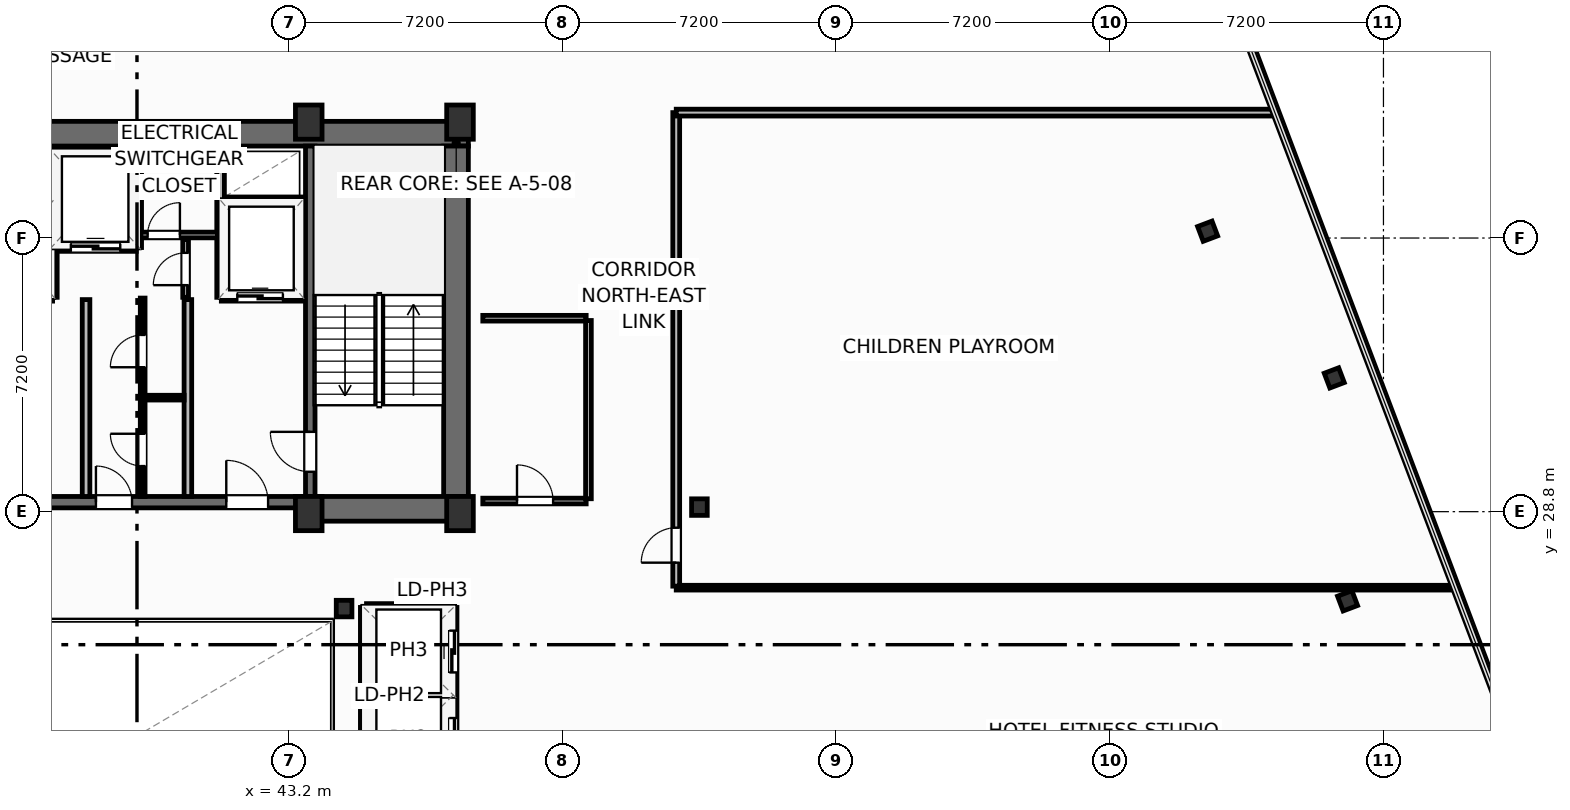
"""IFC4 building model, lengths in metres.
Left out: names, types, materials, properties, quantities, classifications, styles, units other than length and angle.
Written with IfcOpenShell. Run it as: python <this file> out.ifc"""

import sys

from ifc_helpers import new_model, si_unit, direction, frame, frame_2d, origin, origin_2d, place, context, subcontext, project, spatial, rectangle, i_section, extrude, element, fill, save


model = new_model("IFC4")
c1 = context("Model", 3, precision=1e-05, world=origin(), true_north=direction((0.0, 1.0)))
c2 = subcontext(c1, "Body", "Model", "MODEL_VIEW")
j1 = project(units=[si_unit("LENGTHUNIT", "METRE"), si_unit("PLANEANGLEUNIT", "RADIAN")], contexts=[c1])
p1 = place(None, origin())
s1 = spatial("IfcSite", under=j1, at=p1, CompositionType="ELEMENT")
p2 = place(p1, origin())
s2 = spatial("IfcBuilding", under=s1, at=p2, CompositionType="ELEMENT")
p3 = place(p2, frame((0.0, 0.0, 242.3)))
s3 = spatial("IfcBuildingStorey", under=s2, at=p3, CompositionType="ELEMENT", Elevation=242.3)
for number, where, z_axis, x_axis in (
    (1, (43.72, 28.75, 0.0), (0.0, 0.0, 1.0), (1.0, 0.0, 0.0)),
    (2, (47.7, 28.75, 0.0), (0.0, 0.0, 1.0), (1.0, 0.0, 0.0)),
    (3, (43.72, 39.05, 0.0), (0.0, 0.0, 1.0), (1.0, 0.0, 0.0)),
    (4, (47.7, 39.05, 0.0), (0.0, 0.0, 1.0), (1.0, 0.0, 0.0)),
):
    element("IfcColumn", number, at=place(p3, frame(where, z_axis=z_axis, x_axis=x_axis)), inside=s3, PredefinedType="COLUMN", context=c2, shape_type="SweptSolid", body=[
        extrude(rectangle(XDim=0.7, YDim=0.9, at=origin_2d()), origin(), (0.0, 0.0, 1.0), 3.7),
    ])
for number, where, z_axis, x_axis in (
    (5, (44.65, 26.25, 0.0), (0.0, 0.0, 1.0), (1.0, 0.0, 0.0)),
    (6, (54.0, 28.92, 0.0), (0.0, 0.0, 1.0), (1.0, 0.0, 0.0)),
):
    element("IfcColumn", number, at=place(p3, frame(where, z_axis=z_axis, x_axis=x_axis)), inside=s3, PredefinedType="COLUMN", context=c2, shape_type="SweptSolid", body=[
        extrude(i_section(OverallWidth=0.412, OverallDepth=0.435, WebThickness=0.036, FlangeThickness=0.057, FilletRadius=0.025, at=origin_2d()), origin(), (0.0, 0.0, 1.0), 3.7),
    ])
p4 = place(p3, frame((30.48, 38.745, 0.0), z_axis=(0.0, 0.0, 1.0), x_axis=(1.0, 0.0, 0.0)))
e7 = element("IfcWall", 7, at=p4, inside=s3, PredefinedType="SHEAR", context=c2, shape_type="SweptSolid", body=[
    extrude(rectangle(XDim=17.44, YDim=0.65, at=frame_2d((8.72, 0.0))), origin(), (0.0, 0.0, 1.0), 3.45),
])
p5 = place(p3, frame((47.595, 29.2, 0.0), z_axis=(0.0, 0.0, 1.0), x_axis=(0.0, 1.0, 0.0)))
e8 = element("IfcWall", 8, at=p5, inside=s3, PredefinedType="SHEAR", context=c2, shape_type="SweptSolid", body=[
    extrude(rectangle(XDim=9.22, YDim=0.65, at=frame_2d((4.61, 0.0))), origin(), (0.0, 0.0, 1.0), 3.45),
])
p6 = place(p3, frame((43.6, 28.875, 0.0), z_axis=(0.0, 0.0, 1.0), x_axis=(1.0, 0.0, 0.0)))
e9 = element("IfcWall", 9, at=p6, inside=s3, PredefinedType="SHEAR", context=c2, shape_type="SweptSolid", body=[
    extrude(rectangle(XDim=4.32, YDim=0.65, at=frame_2d((2.16, 0.0))), origin(), (0.0, 0.0, 1.0), 3.45),
])
p7 = place(p3, frame((34.8, 29.05, 0.0), z_axis=(0.0, 0.0, 1.0), x_axis=(1.0, 0.0, 0.0)))
e10 = element("IfcWall", 10, at=p7, inside=s3, PredefinedType="SHEAR", context=c2, shape_type="SweptSolid", body=[
    extrude(rectangle(XDim=8.8, YDim=0.3, at=frame_2d((4.4, 0.0))), origin(), (0.0, 0.0, 1.0), 3.45),
])
p8 = place(p7, frame((0.95, 0.0, 0.0)))
e11 = element("IfcOpeningElement", 11, at=p8, cuts=e10, PredefinedType="OPENING", context=c2, shape_type="SweptSolid", body=[
    extrude(rectangle(XDim=1.1, YDim=2.15, at=frame_2d((0.55, 1.075))), frame((0.0, 0.16, 0.0), z_axis=(0.0, -1.0, 0.0), x_axis=(1.0, 0.0, 0.0)), (0.0, 0.0, 1.0), 0.32),
])
p9 = place(p7, frame((6.75, 0.0, 0.0)))
e12 = element("IfcOpeningElement", 12, at=p9, cuts=e10, PredefinedType="OPENING", context=c2, shape_type="SweptSolid", body=[
    extrude(rectangle(XDim=1.1, YDim=2.15, at=frame_2d((0.55, 1.075))), frame((0.0, 0.16, 0.0), z_axis=(0.0, -1.0, 0.0), x_axis=(1.0, 0.0, 0.0)), (0.0, 0.0, 1.0), 0.32),
])
p10 = place(p7, frame((3.32, 0.0, 0.0)))
e13 = element("IfcOpeningElement", 13, at=p10, cuts=e10, PredefinedType="OPENING", context=c2, shape_type="SweptSolid", body=[
    extrude(rectangle(XDim=0.95, YDim=2.15, at=frame_2d((0.475, 1.075))), frame((0.0, 0.16, 0.0), z_axis=(0.0, -1.0, 0.0), x_axis=(1.0, 0.0, 0.0)), (0.0, 0.0, 1.0), 0.32),
])
p11 = place(p3, frame((43.76, 29.2, 0.0), z_axis=(0.0, 0.0, 1.0), x_axis=(0.0, 1.0, 0.0)))
e14 = element("IfcWall", 14, at=p11, inside=s3, PredefinedType="SHEAR", context=c2, shape_type="SweptSolid", body=[
    extrude(rectangle(XDim=9.22, YDim=0.25, at=frame_2d((4.61, 0.0))), origin(), (0.0, 0.0, 1.0), 3.45),
])
p12 = place(p11, frame((0.65, 0.0, 0.0)))
e15 = element("IfcOpeningElement", 15, at=p12, cuts=e14, PredefinedType="OPENING", context=c2, shape_type="SweptSolid", body=[
    extrude(rectangle(XDim=1.05, YDim=2.15, at=frame_2d((0.525, 1.075))), frame((0.0, 0.135, 0.0), z_axis=(0.0, -1.0, 0.0), x_axis=(1.0, 0.0, 0.0)), (0.0, 0.0, 1.0), 0.27),
])
for number, where, z_axis, x_axis in (
    (16, (71.055, 26.453, 0.0), (0.0, 0.0, 1.0), (0.935, 0.354, 0.0)),
    (17, (70.706, 32.32, 0.0), (0.0, 0.0, 1.0), (0.935, 0.354, 0.0)),
    (18, (67.373, 36.18, 0.0), (0.0, 0.0, 1.0), (0.935, 0.354, 0.0)),
):
    element("IfcColumn", number, at=place(p3, frame(where, z_axis=z_axis, x_axis=x_axis)), inside=s3, PredefinedType="COLUMN", context=c2, shape_type="SweptSolid", body=[
        extrude(i_section(OverallWidth=0.406, OverallDepth=0.416, WebThickness=0.03, FlangeThickness=0.048, FilletRadius=0.025, at=origin_2d()), origin(), (0.0, 0.0, 1.0), 3.7),
    ])
p13 = place(p3, frame((53.39, 26.8, 0.0), z_axis=(0.0, 0.0, 1.0), x_axis=(1.0, 0.0, 0.0)))
e19 = element("IfcWall", 19, at=p13, inside=s3, PredefinedType="PARTITIONING", context=c2, shape_type="SweptSolid", body=[
    extrude(rectangle(XDim=20.445, YDim=0.125, at=frame_2d((10.223, 0.0))), origin(), (0.0, 0.0, 1.0), 2.739),
])
p14 = place(p3, frame((53.39, 26.84, 0.0), z_axis=(0.0, 0.0, 1.0), x_axis=(0.0, 1.0, 0.0)))
e20 = element("IfcWall", 20, at=p14, inside=s3, PredefinedType="PARTITIONING", context=c2, shape_type="SweptSolid", body=[
    extrude(rectangle(XDim=12.46, YDim=0.18, at=frame_2d((6.23, 0.0))), origin(), (0.0, 0.0, 1.0), 3.45),
])
p15 = place(p14, frame((0.618, 0.0, 0.0)))
e21 = element("IfcOpeningElement", 21, at=p15, cuts=e20, PredefinedType="OPENING", context=c2, shape_type="SweptSolid", body=[
    extrude(rectangle(XDim=0.92, YDim=2.05, at=frame_2d((0.46, 1.025))), frame((0.0, 0.1, 0.0), z_axis=(0.0, -1.0, 0.0), x_axis=(1.0, 0.0, 0.0)), (0.0, 0.0, 1.0), 0.2),
])
p16 = place(p3, frame((53.39, 39.3, 0.0), z_axis=(0.0, 0.0, 1.0), x_axis=(1.0, 0.0, 0.0)))
e22 = element("IfcWall", 22, at=p16, inside=s3, PredefinedType="PARTITIONING", context=c2, shape_type="SweptSolid", body=[
    extrude(rectangle(XDim=15.713, YDim=0.18, at=frame_2d((7.856, 0.0))), origin(), (0.0, 0.0, 1.0), 3.45),
])
for number, where, z_axis, x_axis in (
    (23, (37.86, 29.2, 0.0), (0.0, 0.0, 1.0), (0.0, 1.0, 0.0)),
    (24, (40.54, 29.2, 0.0), (0.0, 0.0, 1.0), (0.0, 1.0, 0.0)),
):
    element("IfcWall", number, at=place(p3, frame(where, z_axis=z_axis, x_axis=x_axis)), inside=s3, PredefinedType="PARTITIONING", context=c2, shape_type="SweptSolid", body=[
        extrude(rectangle(XDim=5.18, YDim=0.2, at=frame_2d((2.59, 0.0))), origin(), (0.0, 0.0, 1.0), 3.45),
    ])
p17 = place(p3, frame((37.0, 34.44, 0.0), z_axis=(0.0, 0.0, 1.0), x_axis=(0.0, 1.0, 0.0)))
e25 = element("IfcWall", 25, at=p17, inside=s3, PredefinedType="PARTITIONING", context=c2, shape_type="SweptSolid", body=[
    extrude(rectangle(XDim=3.9, YDim=0.2, at=frame_2d((1.95, 0.0))), origin(), (0.0, 0.0, 1.0), 3.45),
])
p18 = place(p3, frame((41.42, 34.44, 0.0), z_axis=(0.0, 0.0, 1.0), x_axis=(1.0, 0.0, 0.0)))
e26 = element("IfcWall", 26, at=p18, inside=s3, PredefinedType="PARTITIONING", context=c2, shape_type="SweptSolid", body=[
    extrude(rectangle(XDim=2.18, YDim=0.2, at=frame_2d((1.09, 0.0))), origin(), (0.0, 0.0, 1.0), 3.45),
])
p19 = place(p18, frame((0.42, 0.0, 0.0)))
e27 = element("IfcOpeningElement", 27, at=p19, cuts=e26, PredefinedType="OPENING", context=c2, shape_type="SweptSolid", body=[
    extrude(rectangle(XDim=1.2, YDim=2.2, at=frame_2d((0.6, 1.1))), frame((0.0, 0.11, 0.0), z_axis=(0.0, -1.0, 0.0), x_axis=(1.0, 0.0, 0.0)), (0.0, 0.0, 1.0), 0.22),
])
p20 = place(p3, frame((41.42, 36.98, 0.0), z_axis=(0.0, 0.0, 1.0), x_axis=(1.0, 0.0, 0.0)))
e28 = element("IfcWall", 28, at=p20, inside=s3, PredefinedType="PARTITIONING", context=c2, shape_type="SweptSolid", body=[
    extrude(rectangle(XDim=2.18, YDim=0.2, at=frame_2d((1.09, 0.0))), origin(), (0.0, 0.0, 1.0), 3.45),
])
p21 = place(p3, frame((41.4, 34.44, 0.0), z_axis=(0.0, 0.0, 1.0), x_axis=(0.0, 1.0, 0.0)))
e29 = element("IfcWall", 29, at=p21, inside=s3, PredefinedType="PARTITIONING", context=c2, shape_type="SweptSolid", body=[
    extrude(rectangle(XDim=3.9, YDim=0.2, at=frame_2d((1.95, 0.0))), origin(), (0.0, 0.0, 1.0), 3.45),
])
p22 = place(p3, frame((37.06, 35.75, 0.0), z_axis=(0.0, 0.0, 1.0), x_axis=(1.0, 0.0, 0.0)))
e30 = element("IfcWall", 30, at=p22, inside=s3, PredefinedType="PARTITIONING", context=c2, shape_type="SweptSolid", body=[
    extrude(rectangle(XDim=2.12, YDim=0.2, at=frame_2d((1.06, 0.0))), origin(), (0.0, 0.0, 1.0), 3.45),
])
p23 = place(p22, frame((0.4, 0.0, 0.0)))
e31 = element("IfcOpeningElement", 31, at=p23, cuts=e30, PredefinedType="OPENING", context=c2, shape_type="SweptSolid", body=[
    extrude(rectangle(XDim=1.3, YDim=2.2, at=frame_2d((0.65, 1.1))), frame((0.0, 0.11, 0.0), z_axis=(0.0, -1.0, 0.0), x_axis=(1.0, 0.0, 0.0)), (0.0, 0.0, 1.0), 0.22),
])
p24 = place(p3, frame((39.22, 35.75, 0.0), z_axis=(0.0, 0.0, 1.0), x_axis=(0.0, 1.0, 0.0)))
e32 = element("IfcWall", 32, at=p24, inside=s3, PredefinedType="PARTITIONING", context=c2, shape_type="SweptSolid", body=[
    extrude(rectangle(XDim=2.59, YDim=0.2, at=frame_2d((1.295, 0.0))), origin(), (0.0, 0.0, 1.0), 3.45),
])
p25 = place(p3, frame((39.3, 36.08, 0.0), z_axis=(0.0, 0.0, 1.0), x_axis=(1.0, 0.0, 0.0)))
e33 = element("IfcWall", 33, at=p25, inside=s3, PredefinedType="PARTITIONING", context=c2, shape_type="SweptSolid", body=[
    extrude(rectangle(XDim=2.02, YDim=0.15, at=frame_2d((1.01, 0.0))), origin(), (0.0, 0.0, 1.0), 3.45),
])
p26 = place(p25, frame((0.18, 0.0, 0.0)))
e34 = element("IfcOpeningElement", 34, at=p26, cuts=e33, PredefinedType="OPENING", context=c2, shape_type="SweptSolid", body=[
    extrude(rectangle(XDim=0.85, YDim=2.05, at=frame_2d((0.425, 1.025))), frame((0.0, 0.085, 0.0), z_axis=(0.0, -1.0, 0.0), x_axis=(1.0, 0.0, 0.0)), (0.0, 0.0, 1.0), 0.17),
])
p27 = place(p3, frame((40.48, 34.44, 0.0), z_axis=(0.0, 0.0, 1.0), x_axis=(0.0, 1.0, 0.0)))
e35 = element("IfcWall", 35, at=p27, inside=s3, PredefinedType="PARTITIONING", context=c2, shape_type="SweptSolid", body=[
    extrude(rectangle(XDim=1.52, YDim=0.15, at=frame_2d((0.76, 0.0))), origin(), (0.0, 0.0, 1.0), 3.45),
])
p28 = place(p27, frame((0.32, 0.0, 0.0)))
e36 = element("IfcOpeningElement", 36, at=p28, cuts=e35, PredefinedType="OPENING", context=c2, shape_type="SweptSolid", body=[
    extrude(rectangle(XDim=0.85, YDim=2.05, at=frame_2d((0.425, 1.025))), frame((0.0, 0.085, 0.0), z_axis=(0.0, -1.0, 0.0), x_axis=(1.0, 0.0, 0.0)), (0.0, 0.0, 1.0), 0.17),
])
p29 = place(p3, frame((39.35, 31.8, 0.0), z_axis=(0.0, 0.0, 1.0), x_axis=(1.0, 0.0, 0.0)))
e37 = element("IfcWall", 37, at=p29, inside=s3, PredefinedType="PARTITIONING", context=c2, shape_type="SweptSolid", body=[
    extrude(rectangle(XDim=1.09, YDim=0.125, at=frame_2d((0.545, 0.0))), origin(), (0.0, 0.0, 1.0), 3.45),
])
p30 = place(p3, frame((39.35, 29.2, 0.0), z_axis=(0.0, 0.0, 1.0), x_axis=(0.0, 1.0, 0.0)))
e38 = element("IfcWall", 38, at=p30, inside=s3, PredefinedType="PARTITIONING", context=c2, shape_type="SweptSolid", body=[
    extrude(rectangle(XDim=5.22, YDim=0.125, at=frame_2d((2.61, 0.0))), origin(), (0.0, 0.0, 1.0), 3.45),
])
p31 = place(p30, frame((0.8, 0.0, 0.0)))
e39 = element("IfcOpeningElement", 39, at=p31, cuts=e38, PredefinedType="OPENING", context=c2, shape_type="SweptSolid", body=[
    extrude(rectangle(XDim=0.85, YDim=2.05, at=frame_2d((0.425, 1.025))), frame((0.0, 0.073, 0.0), z_axis=(0.0, -1.0, 0.0), x_axis=(1.0, 0.0, 0.0)), (0.0, 0.0, 1.0), 0.145),
])
p32 = place(p30, frame((3.4, 0.0, 0.0)))
e40 = element("IfcOpeningElement", 40, at=p32, cuts=e38, PredefinedType="OPENING", context=c2, shape_type="SweptSolid", body=[
    extrude(rectangle(XDim=0.85, YDim=2.05, at=frame_2d((0.425, 1.025))), frame((0.0, 0.073, 0.0), z_axis=(0.0, -1.0, 0.0), x_axis=(1.0, 0.0, 0.0)), (0.0, 0.0, 1.0), 0.145),
])
p33 = place(p3, frame((48.3, 29.08, 0.0), z_axis=(0.0, 0.0, 1.0), x_axis=(1.0, 0.0, 0.0)))
e41 = element("IfcWall", 41, at=p33, inside=s3, PredefinedType="PARTITIONING", context=c2, shape_type="SweptSolid", body=[
    extrude(rectangle(XDim=2.72, YDim=0.15, at=frame_2d((1.36, 0.0))), origin(), (0.0, 0.0, 1.0), 2.662),
])
p34 = place(p33, frame((0.9, 0.0, 0.0)))
e42 = element("IfcOpeningElement", 42, at=p34, cuts=e41, PredefinedType="OPENING", context=c2, shape_type="SweptSolid", body=[
    extrude(rectangle(XDim=0.95, YDim=2.05, at=frame_2d((0.475, 1.025))), frame((0.0, 0.085, 0.0), z_axis=(0.0, -1.0, 0.0), x_axis=(1.0, 0.0, 0.0)), (0.0, 0.0, 1.0), 0.17),
])
p35 = place(p3, frame((48.3, 33.89, 0.0), z_axis=(0.0, 0.0, 1.0), x_axis=(1.0, 0.0, 0.0)))
e43 = element("IfcWall", 43, at=p35, inside=s3, PredefinedType="PARTITIONING", context=c2, shape_type="SweptSolid", body=[
    extrude(rectangle(XDim=2.72, YDim=0.15, at=frame_2d((1.36, 0.0))), origin(), (0.0, 0.0, 1.0), 3.45),
])
p36 = place(p3, frame((51.08, 29.14, 0.0), z_axis=(0.0, 0.0, 1.0), x_axis=(0.0, 1.0, 0.0)))
e44 = element("IfcWall", 44, at=p36, inside=s3, PredefinedType="PARTITIONING", context=c2, shape_type="SweptSolid", body=[
    extrude(rectangle(XDim=4.69, YDim=0.15, at=frame_2d((2.345, 0.0))), origin(), (0.0, 0.0, 1.0), 3.45),
])
for number, where, z_axis, x_axis in (
    (45, (45.24, 23.975, 0.0), (0.0, 0.0, 1.0), (1.0, 0.0, 0.0)),
    (46, (45.24, 26.28, 0.0), (0.0, 0.0, 1.0), (1.0, 0.0, 0.0)),
):
    element("IfcWall", number, at=place(p3, frame(where, z_axis=z_axis, x_axis=x_axis)), inside=s3, PredefinedType="PARTITIONING", context=c2, shape_type="SweptSolid", body=[
        extrude(rectangle(XDim=2.22, YDim=0.2, at=frame_2d((1.11, 0.0))), origin(), (0.0, 0.0, 1.0), 3.45),
    ])
p37 = place(p3, frame((45.18, 19.38, 0.0), z_axis=(0.0, 0.0, 1.0), x_axis=(0.0, 1.0, 0.0)))
e47 = element("IfcWall", 47, at=p37, inside=s3, PredefinedType="PARTITIONING", context=c2, shape_type="SweptSolid", body=[
    extrude(rectangle(XDim=6.9, YDim=0.2, at=frame_2d((3.45, 0.0))), origin(), (0.0, 0.0, 1.0), 3.45),
])
p38 = place(p3, frame((47.52, 19.38, 0.0), z_axis=(0.0, 0.0, 1.0), x_axis=(0.0, 1.0, 0.0)))
e48 = element("IfcWall", 48, at=p38, inside=s3, PredefinedType="PARTITIONING", context=c2, shape_type="SweptSolid", body=[
    extrude(rectangle(XDim=6.9, YDim=0.2, at=frame_2d((3.45, 0.0))), origin(), (0.0, 0.0, 1.0), 3.45),
])
p39 = place(p38, frame((0.59, 0.0, 0.0)))
e49 = element("IfcOpeningElement", 49, at=p39, cuts=e48, PredefinedType="OPENING", context=c2, shape_type="SweptSolid", body=[
    extrude(rectangle(XDim=1.1, YDim=2.15, at=frame_2d((0.55, 1.075))), frame((0.0, 0.11, 0.0), z_axis=(0.0, -1.0, 0.0), x_axis=(1.0, 0.0, 0.0)), (0.0, 0.0, 1.0), 0.22),
])
p40 = place(p38, frame((2.89, 0.0, 0.0)))
e50 = element("IfcOpeningElement", 50, at=p40, cuts=e48, PredefinedType="OPENING", context=c2, shape_type="SweptSolid", body=[
    extrude(rectangle(XDim=1.1, YDim=2.15, at=frame_2d((0.55, 1.075))), frame((0.0, 0.11, 0.0), z_axis=(0.0, -1.0, 0.0), x_axis=(1.0, 0.0, 0.0)), (0.0, 0.0, 1.0), 0.22),
])
p41 = place(p38, frame((5.19, 0.0, 0.0)))
e51 = element("IfcOpeningElement", 51, at=p41, cuts=e48, PredefinedType="OPENING", context=c2, shape_type="SweptSolid", body=[
    extrude(rectangle(XDim=1.1, YDim=2.15, at=frame_2d((0.55, 1.075))), frame((0.0, 0.11, 0.0), z_axis=(0.0, -1.0, 0.0), x_axis=(1.0, 0.0, 0.0)), (0.0, 0.0, 1.0), 0.22),
])
p42 = place(p15, origin())
e52 = element("IfcDoor", 52, at=p42, inside=s3, OperationType="SINGLE_SWING_LEFT", PredefinedType="DOOR", context=c2, shape_type="SweptSolid", body=[
    extrude(rectangle(XDim=0.92, YDim=2.05, at=frame_2d((0.46, 1.025))), frame((0.0, 0.025, 0.0), z_axis=(0.0, -1.0, 0.0), x_axis=(1.0, 0.0, 0.0)), (0.0, 0.0, 1.0), 0.05),
])
fill(e21, e52)
p43 = place(p12, origin())
e53 = element("IfcDoor", 53, at=p43, inside=s3, OperationType="SINGLE_SWING_RIGHT", PredefinedType="DOOR", context=c2, shape_type="SweptSolid", body=[
    extrude(rectangle(XDim=1.05, YDim=2.15, at=frame_2d((0.525, 1.075))), frame((0.0, 0.025, 0.0), z_axis=(0.0, -1.0, 0.0), x_axis=(1.0, 0.0, 0.0)), (0.0, 0.0, 1.0), 0.05),
])
fill(e15, e53)
p44 = place(p9, origin())
e54 = element("IfcDoor", 54, at=p44, inside=s3, OperationType="SINGLE_SWING_LEFT", PredefinedType="DOOR", context=c2, shape_type="SweptSolid", body=[
    extrude(rectangle(XDim=1.1, YDim=2.15, at=frame_2d((0.55, 1.075))), frame((0.0, 0.025, 0.0), z_axis=(0.0, -1.0, 0.0), x_axis=(1.0, 0.0, 0.0)), (0.0, 0.0, 1.0), 0.05),
])
fill(e12, e54)
p45 = place(p19, origin())
e55 = element("IfcDoor", 55, at=p45, inside=s3, OperationType="SLIDING_TO_LEFT", PredefinedType="DOOR", context=c2, shape_type="SweptSolid", body=[
    extrude(rectangle(XDim=1.2, YDim=2.2, at=frame_2d((0.6, 1.1))), frame((0.0, 0.025, 0.0), z_axis=(0.0, -1.0, 0.0), x_axis=(1.0, 0.0, 0.0)), (0.0, 0.0, 1.0), 0.05),
])
fill(e27, e55)
p46 = place(p23, origin())
e56 = element("IfcDoor", 56, at=p46, inside=s3, OperationType="SLIDING_TO_LEFT", PredefinedType="DOOR", context=c2, shape_type="SweptSolid", body=[
    extrude(rectangle(XDim=1.3, YDim=2.2, at=frame_2d((0.65, 1.1))), frame((0.0, 0.025, 0.0), z_axis=(0.0, -1.0, 0.0), x_axis=(1.0, 0.0, 0.0)), (0.0, 0.0, 1.0), 0.05),
])
fill(e31, e56)
p47 = place(p26, origin())
e57 = element("IfcDoor", 57, at=p47, inside=s3, OperationType="SINGLE_SWING_RIGHT", PredefinedType="DOOR", context=c2, shape_type="SweptSolid", body=[
    extrude(rectangle(XDim=0.85, YDim=2.05, at=frame_2d((0.425, 1.025))), frame((0.0, 0.025, 0.0), z_axis=(0.0, -1.0, 0.0), x_axis=(1.0, 0.0, 0.0)), (0.0, 0.0, 1.0), 0.05),
])
fill(e34, e57)
p48 = place(p28, origin())
e58 = element("IfcDoor", 58, at=p48, inside=s3, OperationType="SINGLE_SWING_LEFT", PredefinedType="DOOR", context=c2, shape_type="SweptSolid", body=[
    extrude(rectangle(XDim=0.85, YDim=2.05, at=frame_2d((0.425, 1.025))), frame((0.0, 0.025, 0.0), z_axis=(0.0, -1.0, 0.0), x_axis=(1.0, 0.0, 0.0)), (0.0, 0.0, 1.0), 0.05),
])
fill(e36, e58)
p49 = place(p31, origin())
e59 = element("IfcDoor", 59, at=p49, inside=s3, OperationType="SINGLE_SWING_RIGHT", PredefinedType="DOOR", context=c2, shape_type="SweptSolid", body=[
    extrude(rectangle(XDim=0.85, YDim=2.05, at=frame_2d((0.425, 1.025))), frame((0.0, 0.025, 0.0), z_axis=(0.0, -1.0, 0.0), x_axis=(1.0, 0.0, 0.0)), (0.0, 0.0, 1.0), 0.05),
])
fill(e39, e59)
p50 = place(p32, origin())
e60 = element("IfcDoor", 60, at=p50, inside=s3, OperationType="SINGLE_SWING_LEFT", PredefinedType="DOOR", context=c2, shape_type="SweptSolid", body=[
    extrude(rectangle(XDim=0.85, YDim=2.05, at=frame_2d((0.425, 1.025))), frame((0.0, 0.025, 0.0), z_axis=(0.0, -1.0, 0.0), x_axis=(1.0, 0.0, 0.0)), (0.0, 0.0, 1.0), 0.05),
])
fill(e40, e60)
p51 = place(p10, origin())
e61 = element("IfcDoor", 61, at=p51, inside=s3, OperationType="SINGLE_SWING_LEFT", PredefinedType="DOOR", context=c2, shape_type="SweptSolid", body=[
    extrude(rectangle(XDim=0.95, YDim=2.15, at=frame_2d((0.475, 1.075))), frame((0.0, 0.025, 0.0), z_axis=(0.0, -1.0, 0.0), x_axis=(1.0, 0.0, 0.0)), (0.0, 0.0, 1.0), 0.05),
])
fill(e13, e61)
p52 = place(p34, origin())
e62 = element("IfcDoor", 62, at=p52, inside=s3, OperationType="SINGLE_SWING_LEFT", PredefinedType="DOOR", context=c2, shape_type="SweptSolid", body=[
    extrude(rectangle(XDim=0.95, YDim=2.05, at=frame_2d((0.475, 1.025))), frame((0.0, 0.025, 0.0), z_axis=(0.0, -1.0, 0.0), x_axis=(1.0, 0.0, 0.0)), (0.0, 0.0, 1.0), 0.05),
])
fill(e42, e62)
p53 = place(p40, origin())
e63 = element("IfcDoor", 63, at=p53, inside=s3, OperationType="SLIDING_TO_LEFT", PredefinedType="DOOR", context=c2, shape_type="SweptSolid", body=[
    extrude(rectangle(XDim=1.1, YDim=2.15, at=frame_2d((0.55, 1.075))), frame((0.0, 0.025, 0.0), z_axis=(0.0, -1.0, 0.0), x_axis=(1.0, 0.0, 0.0)), (0.0, 0.0, 1.0), 0.05),
])
fill(e50, e63)
p54 = place(p41, origin())
e64 = element("IfcDoor", 64, at=p54, inside=s3, OperationType="SLIDING_TO_LEFT", PredefinedType="DOOR", context=c2, shape_type="SweptSolid", body=[
    extrude(rectangle(XDim=1.1, YDim=2.15, at=frame_2d((0.55, 1.075))), frame((0.0, 0.025, 0.0), z_axis=(0.0, -1.0, 0.0), x_axis=(1.0, 0.0, 0.0)), (0.0, 0.0, 1.0), 0.05),
])
fill(e51, e64)
save(model, sys.argv[1])
